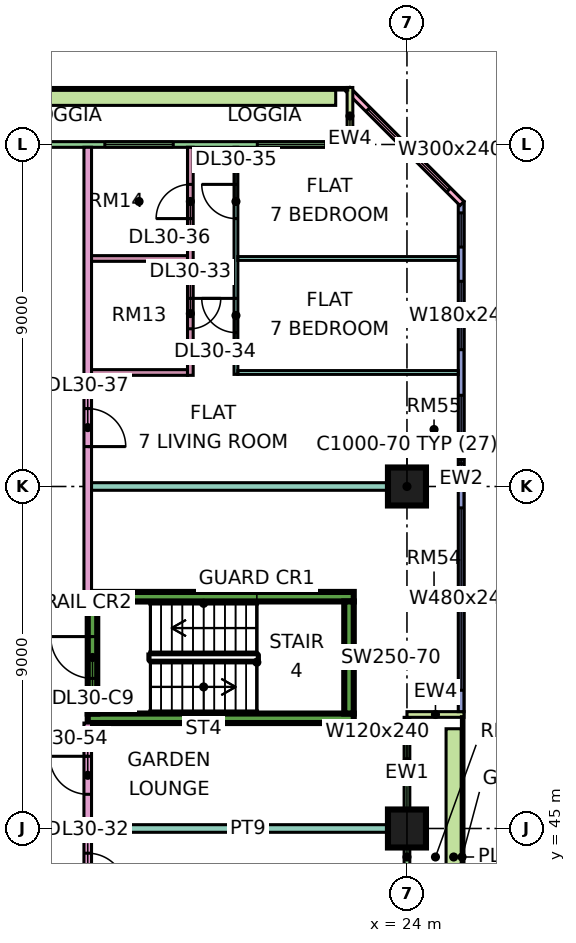
"""IFC4 building model, lengths in metres.
Left out: names, types, materials, properties, quantities, classifications, styles, units other than length and angle.
Written with IfcOpenShell. Run it as: python <this file> out.ifc"""

import sys

from ifc_helpers import new_model, si_unit, direction, frame, frame_2d, origin, origin_2d, place, context, subcontext, project, spatial, rectangle, extrude, element, fill, save


model = new_model("IFC4")
c1 = context("Model", 3, precision=1e-05, world=origin(), true_north=direction((0.0, 1.0)))
c2 = subcontext(c1, "Body", "Model", "MODEL_VIEW")
j1 = project(units=[si_unit("LENGTHUNIT", "METRE"), si_unit("PLANEANGLEUNIT", "RADIAN")], contexts=[c1])
p1 = place(None, origin())
s1 = spatial("IfcSite", under=j1, at=p1, CompositionType="ELEMENT")
p2 = place(p1, origin())
s2 = spatial("IfcBuilding", under=s1, at=p2, CompositionType="ELEMENT")
p3 = place(p2, frame((0.0, 0.0, 129.4)))
s3 = spatial("IfcBuildingStorey", under=s2, at=p3, CompositionType="ELEMENT", Elevation=129.4)
for number, where, z_axis, x_axis in (
    (1, (24.0, 45.0, 0.0), (0.0, 0.0, 1.0), (1.0, 0.0, 0.0)),
    (2, (24.0, 54.0, 0.0), (0.0, 0.0, 1.0), (1.0, 0.0, 0.0)),
):
    element("IfcColumn", number, at=place(p3, frame(where, z_axis=z_axis, x_axis=x_axis)), inside=s3, PredefinedType="COLUMN", context=c2, shape_type="SweptSolid", body=[
        extrude(rectangle(XDim=1.0, YDim=1.0, at=origin_2d()), origin(), (0.0, 0.0, 1.0), 3.75),
    ])
for number, where, z_axis, x_axis in (
    (3, (15.6, 47.9, 0.0), (0.0, 0.0, 1.0), (1.0, 0.0, 0.0)),
    (4, (15.6, 51.1, 0.0), (0.0, 0.0, 1.0), (1.0, 0.0, 0.0)),
):
    element("IfcWall", number, at=place(p3, frame(where, z_axis=z_axis, x_axis=x_axis)), inside=s3, PredefinedType="SHEAR", context=c2, shape_type="SweptSolid", body=[
        extrude(rectangle(XDim=7.0, YDim=0.25, at=frame_2d((3.5, 0.0))), origin(), (0.0, 0.0, 1.0), 3.75),
    ])
p4 = place(p3, frame((15.725, 48.025, 0.0), z_axis=(0.0, 0.0, 1.0), x_axis=(0.0, 1.0, 0.0)))
e5 = element("IfcWall", 5, at=p4, inside=s3, PredefinedType="SHEAR", context=c2, shape_type="SweptSolid", body=[
    extrude(rectangle(XDim=2.95, YDim=0.25, at=frame_2d((1.475, 0.0))), origin(), (0.0, 0.0, 1.0), 3.75),
])
p5 = place(p4, frame((0.925, 0.0, 0.0)))
e6 = element("IfcOpeningElement", 6, at=p5, cuts=e5, PredefinedType="OPENING", context=c2, shape_type="SweptSolid", body=[
    extrude(rectangle(XDim=1.1, YDim=2.2, at=frame_2d((0.55, 1.1))), frame((0.0, 0.135, 0.0), z_axis=(0.0, -1.0, 0.0), x_axis=(1.0, 0.0, 0.0)), (0.0, 0.0, 1.0), 0.27),
])
p6 = place(p3, frame((22.475, 48.025, 0.0), z_axis=(0.0, 0.0, 1.0), x_axis=(0.0, 1.0, 0.0)))
e7 = element("IfcWall", 7, at=p6, inside=s3, PredefinedType="SHEAR", context=c2, shape_type="SweptSolid", body=[
    extrude(rectangle(XDim=2.95, YDim=0.25, at=frame_2d((1.475, 0.0))), origin(), (0.0, 0.0, 1.0), 3.75),
])
p7 = place(p3, frame((24.0, 40.575, 0.0), z_axis=(0.0, 0.0, 1.0), x_axis=(0.0, 1.0, 0.0)))
e8 = element("IfcWall", 8, at=p7, inside=s3, PredefinedType="SOLIDWALL", context=c2, shape_type="SweptSolid", body=[
    extrude(rectangle(XDim=7.35, YDim=0.15, at=frame_2d((3.675, 0.0))), origin(), (0.0, 0.0, 1.0), 3.35),
])
p8 = place(p7, frame((0.262, 0.0, 0.45)))
e9 = element("IfcOpeningElement", 9, at=p8, cuts=e8, PredefinedType="OPENING", context=c2, shape_type="SweptSolid", body=[
    extrude(rectangle(XDim=0.9, YDim=2.4, at=frame_2d((0.45, 1.2))), frame((0.0, 0.085, 0.0), z_axis=(0.0, -1.0, 0.0), x_axis=(1.0, 0.0, 0.0)), (0.0, 0.0, 1.0), 0.17),
])
p9 = place(p7, frame((2.025, 0.0, 0.0)))
e10 = element("IfcOpeningElement", 10, at=p9, cuts=e8, PredefinedType="OPENING", context=c2, shape_type="SweptSolid", body=[
    extrude(rectangle(XDim=1.2, YDim=2.4, at=frame_2d((0.6, 1.2))), frame((0.0, 0.085, 0.0), z_axis=(0.0, -1.0, 0.0), x_axis=(1.0, 0.0, 0.0)), (0.0, 0.0, 1.0), 0.17),
])
p10 = place(p7, frame((5.587, 0.0, 0.45)))
e11 = element("IfcOpeningElement", 11, at=p10, cuts=e8, PredefinedType="OPENING", context=c2, shape_type="SweptSolid", body=[
    extrude(rectangle(XDim=1.2, YDim=2.4, at=frame_2d((0.6, 1.2))), frame((0.0, 0.085, 0.0), z_axis=(0.0, -1.0, 0.0), x_axis=(1.0, 0.0, 0.0)), (0.0, 0.0, 1.0), 0.17),
])
p11 = place(p3, frame((25.5, 48.0, 0.0), z_axis=(0.0, 0.0, 1.0), x_axis=(-1.0, 0.0, 0.0)))
e12 = element("IfcWall", 12, at=p11, inside=s3, PredefinedType="SOLIDWALL", context=c2, shape_type="SweptSolid", body=[
    extrude(rectangle(XDim=1.5, YDim=0.15, at=frame_2d((0.75, 0.0))), origin(), (0.0, 0.0, 1.0), 3.35),
])
p12 = place(p3, frame((25.425, 48.075, 0.0), z_axis=(0.0, 0.0, 1.0), x_axis=(0.0, 1.0, 0.0)))
e13 = element("IfcWall", 13, at=p12, inside=s3, PredefinedType="SOLIDWALL", context=c2, shape_type="SweptSolid", body=[
    extrude(rectangle(XDim=13.425, YDim=0.15, at=frame_2d((6.712, 0.0))), origin(), (0.0, 0.0, 1.0), 3.35),
])
p13 = place(p12, frame((0.562, 0.0, 0.45)))
e14 = element("IfcOpeningElement", 14, at=p13, cuts=e13, PredefinedType="OPENING", context=c2, shape_type="SweptSolid", body=[
    extrude(rectangle(XDim=4.8, YDim=2.4, at=frame_2d((2.4, 1.2))), frame((0.0, 0.085, 0.0), z_axis=(0.0, -1.0, 0.0), x_axis=(1.0, 0.0, 0.0)), (0.0, 0.0, 1.0), 0.17),
])
p14 = place(p12, frame((6.525, 0.0, 0.45)))
e15 = element("IfcOpeningElement", 15, at=p14, cuts=e13, PredefinedType="OPENING", context=c2, shape_type="SweptSolid", body=[
    extrude(rectangle(XDim=1.8, YDim=2.4, at=frame_2d((0.9, 1.2))), frame((0.0, 0.085, 0.0), z_axis=(0.0, -1.0, 0.0), x_axis=(1.0, 0.0, 0.0)), (0.0, 0.0, 1.0), 0.17),
])
p15 = place(p12, frame((9.525, 0.0, 0.45)))
e16 = element("IfcOpeningElement", 16, at=p15, cuts=e13, PredefinedType="OPENING", context=c2, shape_type="SweptSolid", body=[
    extrude(rectangle(XDim=1.8, YDim=2.4, at=frame_2d((0.9, 1.2))), frame((0.0, 0.085, 0.0), z_axis=(0.0, -1.0, 0.0), x_axis=(1.0, 0.0, 0.0)), (0.0, 0.0, 1.0), 0.17),
])
p16 = place(p12, frame((12.225, 0.0, 0.45)))
e17 = element("IfcOpeningElement", 17, at=p16, cuts=e13, PredefinedType="OPENING", context=c2, shape_type="SweptSolid", body=[
    extrude(rectangle(XDim=0.9, YDim=2.4, at=frame_2d((0.45, 1.2))), frame((0.0, 0.085, 0.0), z_axis=(0.0, -1.0, 0.0), x_axis=(1.0, 0.0, 0.0)), (0.0, 0.0, 1.0), 0.17),
])
p17 = place(p3, frame((25.447, 61.447, 0.0), z_axis=(0.0, 0.0, 1.0), x_axis=(-0.707106781187, 0.707106781187, 0.0)))
e18 = element("IfcWall", 18, at=p17, inside=s3, PredefinedType="SOLIDWALL", context=c2, shape_type="SweptSolid", body=[
    extrude(rectangle(XDim=4.243, YDim=0.15, at=frame_2d((2.121, 0.0))), origin(), (0.0, 0.0, 1.0), 3.35),
])
p18 = place(p17, frame((0.498, 0.0, 0.45)))
e19 = element("IfcOpeningElement", 19, at=p18, cuts=e18, PredefinedType="OPENING", context=c2, shape_type="SweptSolid", body=[
    extrude(rectangle(XDim=3.0, YDim=2.4, at=frame_2d((1.5, 1.2))), frame((0.0, 0.085, 0.0), z_axis=(0.0, -1.0, 0.0), x_axis=(1.0, 0.0, 0.0)), (0.0, 0.0, 1.0), 0.17),
])
p19 = place(p3, frame((22.425, 63.0, 0.0), z_axis=(0.0, 0.0, 1.0), x_axis=(-1.0, 0.0, 0.0)))
e20 = element("IfcWall", 20, at=p19, inside=s3, PredefinedType="SOLIDWALL", context=c2, shape_type="SweptSolid", body=[
    extrude(rectangle(XDim=10.35, YDim=0.15, at=frame_2d((5.175, 0.0))), origin(), (0.0, 0.0, 1.0), 3.35),
])
p20 = place(p19, frame((0.562, 0.0, 0.45)))
e21 = element("IfcOpeningElement", 21, at=p20, cuts=e20, PredefinedType="OPENING", context=c2, shape_type="SweptSolid", body=[
    extrude(rectangle(XDim=1.8, YDim=2.4, at=frame_2d((0.9, 1.2))), frame((0.0, 0.085, 0.0), z_axis=(0.0, -1.0, 0.0), x_axis=(1.0, 0.0, 0.0)), (0.0, 0.0, 1.0), 0.17),
])
p21 = place(p19, frame((4.575, 0.0, 0.45)))
e22 = element("IfcOpeningElement", 22, at=p21, cuts=e20, PredefinedType="OPENING", context=c2, shape_type="SweptSolid", body=[
    extrude(rectangle(XDim=1.8, YDim=2.4, at=frame_2d((0.9, 1.2))), frame((0.0, 0.085, 0.0), z_axis=(0.0, -1.0, 0.0), x_axis=(1.0, 0.0, 0.0)), (0.0, 0.0, 1.0), 0.17),
])
p22 = place(p3, frame((22.5, 64.5, 0.0), z_axis=(0.0, 0.0, 1.0), x_axis=(0.0, -1.0, 0.0)))
e23 = element("IfcWall", 23, at=p22, inside=s3, PredefinedType="SOLIDWALL", context=c2, shape_type="SweptSolid", body=[
    extrude(rectangle(XDim=1.5, YDim=0.15, at=frame_2d((0.75, 0.0))), origin(), (0.0, 0.0, 1.0), 3.35),
])
p23 = place(p3, frame((25.229, 40.875, 0.0), z_axis=(0.0, 0.0, 1.0), x_axis=(0.0, 1.0, 0.0)))
e24 = element("IfcWall", 24, at=p23, inside=s3, PredefinedType="SOLIDWALL", context=c2, shape_type="SweptSolid", body=[
    extrude(rectangle(XDim=6.75, YDim=0.4, at=frame_2d((3.375, 0.0))), origin(), (0.0, 0.0, 1.0), 0.7),
])
p24 = place(p3, frame((22.125, 64.229, 0.0), z_axis=(0.0, 0.0, 1.0), x_axis=(-1.0, 0.0, 0.0)))
e25 = element("IfcWall", 25, at=p24, inside=s3, PredefinedType="SOLIDWALL", context=c2, shape_type="SweptSolid", body=[
    extrude(rectangle(XDim=9.75, YDim=0.4, at=frame_2d((4.875, 0.0))), origin(), (0.0, 0.0, 1.0), 0.7),
])
p25 = place(p3, frame((15.6, 20.0, 0.0), z_axis=(0.0, 0.0, 1.0), x_axis=(0.0, 1.0, 0.0)))
e26 = element("IfcWall", 26, at=p25, inside=s3, PredefinedType="PARTITIONING", context=c2, shape_type="SweptSolid", body=[
    extrude(rectangle(XDim=27.775, YDim=0.2, at=frame_2d((13.887, 0.0))), origin(), (0.0, 0.0, 1.0), 3.35),
])
p26 = place(p25, frame((6.55, 0.0, 0.0)))
e27 = element("IfcOpeningElement", 27, at=p26, cuts=e26, PredefinedType="OPENING", context=c2, shape_type="SweptSolid", body=[
    extrude(rectangle(XDim=1.0, YDim=2.1, at=frame_2d((0.5, 1.05))), frame((0.0, 0.11, 0.0), z_axis=(0.0, -1.0, 0.0), x_axis=(1.0, 0.0, 0.0)), (0.0, 0.0, 1.0), 0.22),
])
p27 = place(p25, frame((12.25, 0.0, 0.0)))
e28 = element("IfcOpeningElement", 28, at=p27, cuts=e26, PredefinedType="OPENING", context=c2, shape_type="SweptSolid", body=[
    extrude(rectangle(XDim=1.6, YDim=2.1, at=frame_2d((0.8, 1.05))), frame((0.0, 0.11, 0.0), z_axis=(0.0, -1.0, 0.0), x_axis=(1.0, 0.0, 0.0)), (0.0, 0.0, 1.0), 0.22),
])
p28 = place(p25, frame((23.35, 0.0, 0.0)))
e29 = element("IfcOpeningElement", 29, at=p28, cuts=e26, PredefinedType="OPENING", context=c2, shape_type="SweptSolid", body=[
    extrude(rectangle(XDim=1.0, YDim=2.1, at=frame_2d((0.5, 1.05))), frame((0.0, 0.11, 0.0), z_axis=(0.0, -1.0, 0.0), x_axis=(1.0, 0.0, 0.0)), (0.0, 0.0, 1.0), 0.22),
])
p29 = place(p25, frame((1.15, 0.0, 0.0)))
e30 = element("IfcOpeningElement", 30, at=p29, cuts=e26, PredefinedType="OPENING", context=c2, shape_type="SweptSolid", body=[
    extrude(rectangle(XDim=1.8, YDim=2.1, at=frame_2d((0.9, 1.05))), frame((0.0, 0.11, 0.0), z_axis=(0.0, -1.0, 0.0), x_axis=(1.0, 0.0, 0.0)), (0.0, 0.0, 1.0), 0.22),
])
p30 = place(p25, frame((25.9, 0.0, 0.0)))
e31 = element("IfcOpeningElement", 31, at=p30, cuts=e26, PredefinedType="OPENING", context=c2, shape_type="SweptSolid", body=[
    extrude(rectangle(XDim=1.0, YDim=2.1, at=frame_2d((0.5, 1.05))), frame((0.0, 0.11, 0.0), z_axis=(0.0, -1.0, 0.0), x_axis=(1.0, 0.0, 0.0)), (0.0, 0.0, 1.0), 0.22),
])
p31 = place(p3, frame((15.6, 51.225, 0.0), z_axis=(0.0, 0.0, 1.0), x_axis=(0.0, 1.0, 0.0)))
e32 = element("IfcWall", 32, at=p31, inside=s3, PredefinedType="PARTITIONING", context=c2, shape_type="SweptSolid", body=[
    extrude(rectangle(XDim=11.701, YDim=0.2, at=frame_2d((5.851, 0.0))), origin(), (0.0, 0.0, 1.0), 3.35),
])
p32 = place(p31, frame((3.825, 0.0, 0.0)))
e33 = element("IfcOpeningElement", 33, at=p32, cuts=e32, PredefinedType="OPENING", context=c2, shape_type="SweptSolid", body=[
    extrude(rectangle(XDim=1.0, YDim=2.1, at=frame_2d((0.5, 1.05))), frame((0.0, 0.11, 0.0), z_axis=(0.0, -1.0, 0.0), x_axis=(1.0, 0.0, 0.0)), (0.0, 0.0, 1.0), 0.22),
])
p33 = place(p3, frame((15.7, 45.0, 0.0), z_axis=(0.0, 0.0, 1.0), x_axis=(1.0, 0.0, 0.0)))
e34 = element("IfcWall", 34, at=p33, inside=s3, PredefinedType="PARTITIONING", context=c2, shape_type="SweptSolid", body=[
    extrude(rectangle(XDim=8.226, YDim=0.2, at=frame_2d((4.113, 0.0))), origin(), (0.0, 0.0, 1.0), 3.35),
])
p34 = place(p3, frame((15.7, 54.0, 0.0), z_axis=(0.0, 0.0, 1.0), x_axis=(1.0, 0.0, 0.0)))
e35 = element("IfcWall", 35, at=p34, inside=s3, PredefinedType="PARTITIONING", context=c2, shape_type="SweptSolid", body=[
    extrude(rectangle(XDim=8.3, YDim=0.2, at=frame_2d((4.15, 0.0))), origin(), (0.0, 0.0, 1.0), 3.35),
])
for number, where, z_axis, x_axis in (
    (36, (15.7, 57.0, 0.0), (0.0, 0.0, 1.0), (1.0, 0.0, 0.0)),
    (37, (15.7, 60.0, 0.0), (0.0, 0.0, 1.0), (1.0, 0.0, 0.0)),
):
    element("IfcWall", number, at=place(p3, frame(where, z_axis=z_axis, x_axis=x_axis)), inside=s3, PredefinedType="PARTITIONING", context=c2, shape_type="SweptSolid", body=[
        extrude(rectangle(XDim=2.525, YDim=0.15, at=frame_2d((1.263, 0.0))), origin(), (0.0, 0.0, 1.0), 3.35),
    ])
p35 = place(p3, frame((18.3, 56.925, 0.0), z_axis=(0.0, 0.0, 1.0), x_axis=(0.0, 1.0, 0.0)))
e38 = element("IfcWall", 38, at=p35, inside=s3, PredefinedType="PARTITIONING", context=c2, shape_type="SweptSolid", body=[
    extrude(rectangle(XDim=6.001, YDim=0.15, at=frame_2d((3.0, 0.0))), origin(), (0.0, 0.0, 1.0), 3.35),
])
p36 = place(p35, frame((1.225, 0.0, 0.0)))
e39 = element("IfcOpeningElement", 39, at=p36, cuts=e38, PredefinedType="OPENING", context=c2, shape_type="SweptSolid", body=[
    extrude(rectangle(XDim=0.8, YDim=2.1, at=frame_2d((0.4, 1.05))), frame((0.0, 0.085, 0.0), z_axis=(0.0, -1.0, 0.0), x_axis=(1.0, 0.0, 0.0)), (0.0, 0.0, 1.0), 0.17),
])
p37 = place(p35, frame((4.125, 0.0, 0.0)))
e40 = element("IfcOpeningElement", 40, at=p37, cuts=e38, PredefinedType="OPENING", context=c2, shape_type="SweptSolid", body=[
    extrude(rectangle(XDim=0.9, YDim=2.1, at=frame_2d((0.45, 1.05))), frame((0.0, 0.085, 0.0), z_axis=(0.0, -1.0, 0.0), x_axis=(1.0, 0.0, 0.0)), (0.0, 0.0, 1.0), 0.17),
])
p38 = place(p3, frame((19.5, 56.95, 0.0), z_axis=(0.0, 0.0, 1.0), x_axis=(0.0, 1.0, 0.0)))
e41 = element("IfcWall", 41, at=p38, inside=s3, PredefinedType="PARTITIONING", context=c2, shape_type="SweptSolid", body=[
    extrude(rectangle(XDim=5.976, YDim=0.1, at=frame_2d((2.988, 0.0))), origin(), (0.0, 0.0, 1.0), 3.35),
])
p39 = place(p38, frame((1.1, 0.0, 0.0)))
e42 = element("IfcOpeningElement", 42, at=p39, cuts=e41, PredefinedType="OPENING", context=c2, shape_type="SweptSolid", body=[
    extrude(rectangle(XDim=0.9, YDim=2.1, at=frame_2d((0.45, 1.05))), frame((0.0, 0.06, 0.0), z_axis=(0.0, -1.0, 0.0), x_axis=(1.0, 0.0, 0.0)), (0.0, 0.0, 1.0), 0.12),
])
p40 = place(p38, frame((4.1, 0.0, 0.0)))
e43 = element("IfcOpeningElement", 43, at=p40, cuts=e41, PredefinedType="OPENING", context=c2, shape_type="SweptSolid", body=[
    extrude(rectangle(XDim=0.9, YDim=2.1, at=frame_2d((0.45, 1.05))), frame((0.0, 0.06, 0.0), z_axis=(0.0, -1.0, 0.0), x_axis=(1.0, 0.0, 0.0)), (0.0, 0.0, 1.0), 0.12),
])
p41 = place(p3, frame((19.55, 57.0, 0.0), z_axis=(0.0, 0.0, 1.0), x_axis=(1.0, 0.0, 0.0)))
e44 = element("IfcWall", 44, at=p41, inside=s3, PredefinedType="PARTITIONING", context=c2, shape_type="SweptSolid", body=[
    extrude(rectangle(XDim=5.8, YDim=0.1, at=frame_2d((2.9, 0.0))), origin(), (0.0, 0.0, 1.0), 3.35),
])
p42 = place(p3, frame((19.55, 60.0, 0.0), z_axis=(0.0, 0.0, 1.0), x_axis=(1.0, 0.0, 0.0)))
e45 = element("IfcWall", 45, at=p42, inside=s3, PredefinedType="PARTITIONING", context=c2, shape_type="SweptSolid", body=[
    extrude(rectangle(XDim=5.801, YDim=0.1, at=frame_2d((2.9, 0.0))), origin(), (0.0, 0.0, 1.0), 3.35),
])
p43 = place(p10, origin())
e46 = element("IfcWindow", 46, at=p43, inside=s3, PartitioningType="SINGLE_PANEL", PredefinedType="WINDOW", context=c2, shape_type="SweptSolid", body=[
    extrude(rectangle(XDim=1.2, YDim=2.4, at=frame_2d((0.6, 1.2))), frame((0.0, 0.03, 0.0), z_axis=(0.0, -1.0, 0.0), x_axis=(1.0, 0.0, 0.0)), (0.0, 0.0, 1.0), 0.06),
])
fill(e11, e46)
p44 = place(p13, origin())
e47 = element("IfcWindow", 47, at=p44, inside=s3, PartitioningType="SINGLE_PANEL", PredefinedType="WINDOW", context=c2, shape_type="SweptSolid", body=[
    extrude(rectangle(XDim=4.8, YDim=2.4, at=frame_2d((2.4, 1.2))), frame((0.0, 0.03, 0.0), z_axis=(0.0, -1.0, 0.0), x_axis=(1.0, 0.0, 0.0)), (0.0, 0.0, 1.0), 0.06),
])
fill(e14, e47)
p45 = place(p14, origin())
e48 = element("IfcWindow", 48, at=p45, inside=s3, PartitioningType="SINGLE_PANEL", PredefinedType="WINDOW", context=c2, shape_type="SweptSolid", body=[
    extrude(rectangle(XDim=1.8, YDim=2.4, at=frame_2d((0.9, 1.2))), frame((0.0, 0.03, 0.0), z_axis=(0.0, -1.0, 0.0), x_axis=(1.0, 0.0, 0.0)), (0.0, 0.0, 1.0), 0.06),
])
fill(e15, e48)
p46 = place(p15, origin())
e49 = element("IfcWindow", 49, at=p46, inside=s3, PartitioningType="SINGLE_PANEL", PredefinedType="WINDOW", context=c2, shape_type="SweptSolid", body=[
    extrude(rectangle(XDim=1.8, YDim=2.4, at=frame_2d((0.9, 1.2))), frame((0.0, 0.03, 0.0), z_axis=(0.0, -1.0, 0.0), x_axis=(1.0, 0.0, 0.0)), (0.0, 0.0, 1.0), 0.06),
])
fill(e16, e49)
p47 = place(p16, origin())
e50 = element("IfcWindow", 50, at=p47, inside=s3, PartitioningType="SINGLE_PANEL", PredefinedType="WINDOW", context=c2, shape_type="SweptSolid", body=[
    extrude(rectangle(XDim=0.9, YDim=2.4, at=frame_2d((0.45, 1.2))), frame((0.0, 0.03, 0.0), z_axis=(0.0, -1.0, 0.0), x_axis=(1.0, 0.0, 0.0)), (0.0, 0.0, 1.0), 0.06),
])
fill(e17, e50)
p48 = place(p18, origin())
e51 = element("IfcWindow", 51, at=p48, inside=s3, PartitioningType="SINGLE_PANEL", PredefinedType="WINDOW", context=c2, shape_type="SweptSolid", body=[
    extrude(rectangle(XDim=3.0, YDim=2.4, at=frame_2d((1.5, 1.2))), frame((0.0, 0.03, 0.0), z_axis=(0.0, -1.0, 0.0), x_axis=(1.0, 0.0, 0.0)), (0.0, 0.0, 1.0), 0.06),
])
fill(e19, e51)
p49 = place(p20, origin())
e52 = element("IfcWindow", 52, at=p49, inside=s3, PartitioningType="SINGLE_PANEL", PredefinedType="WINDOW", context=c2, shape_type="SweptSolid", body=[
    extrude(rectangle(XDim=1.8, YDim=2.4, at=frame_2d((0.9, 1.2))), frame((0.0, 0.03, 0.0), z_axis=(0.0, -1.0, 0.0), x_axis=(1.0, 0.0, 0.0)), (0.0, 0.0, 1.0), 0.06),
])
fill(e21, e52)
p50 = place(p21, origin())
e53 = element("IfcWindow", 53, at=p50, inside=s3, PartitioningType="SINGLE_PANEL", PredefinedType="WINDOW", context=c2, shape_type="SweptSolid", body=[
    extrude(rectangle(XDim=1.8, YDim=2.4, at=frame_2d((0.9, 1.2))), frame((0.0, 0.03, 0.0), z_axis=(0.0, -1.0, 0.0), x_axis=(1.0, 0.0, 0.0)), (0.0, 0.0, 1.0), 0.06),
])
fill(e22, e53)
p51 = place(p5, frame((1.1, 0.0, 0.0), z_axis=(0.0, 0.0, 1.0), x_axis=(-1.0, 0.0, 0.0)))
e54 = element("IfcDoor", 54, at=p51, inside=s3, OperationType="SINGLE_SWING_RIGHT", PredefinedType="DOOR", context=c2, shape_type="SweptSolid", body=[
    extrude(rectangle(XDim=1.1, YDim=2.2, at=frame_2d((0.55, 1.1))), frame((0.0, 0.025, 0.0), z_axis=(0.0, -1.0, 0.0), x_axis=(1.0, 0.0, 0.0)), (0.0, 0.0, 1.0), 0.05),
])
fill(e6, e54)
p52 = place(p28, frame((1.0, 0.0, 0.0), z_axis=(0.0, 0.0, 1.0), x_axis=(-1.0, 0.0, 0.0)))
e55 = element("IfcDoor", 55, at=p52, inside=s3, OperationType="SINGLE_SWING_LEFT", PredefinedType="DOOR", context=c2, shape_type="SweptSolid", body=[
    extrude(rectangle(XDim=1.0, YDim=2.1, at=frame_2d((0.5, 1.05))), frame((0.0, 0.025, 0.0), z_axis=(0.0, -1.0, 0.0), x_axis=(1.0, 0.0, 0.0)), (0.0, 0.0, 1.0), 0.05),
])
fill(e29, e55)
p53 = place(p36, origin())
e56 = element("IfcDoor", 56, at=p53, inside=s3, OperationType="SINGLE_SWING_RIGHT", PredefinedType="DOOR", context=c2, shape_type="SweptSolid", body=[
    extrude(rectangle(XDim=0.8, YDim=2.1, at=frame_2d((0.4, 1.05))), frame((0.0, 0.025, 0.0), z_axis=(0.0, -1.0, 0.0), x_axis=(1.0, 0.0, 0.0)), (0.0, 0.0, 1.0), 0.05),
])
fill(e39, e56)
p54 = place(p39, frame((0.9, 0.0, 0.0), z_axis=(0.0, 0.0, 1.0), x_axis=(-1.0, 0.0, 0.0)))
e57 = element("IfcDoor", 57, at=p54, inside=s3, OperationType="SINGLE_SWING_RIGHT", PredefinedType="DOOR", context=c2, shape_type="SweptSolid", body=[
    extrude(rectangle(XDim=0.9, YDim=2.1, at=frame_2d((0.45, 1.05))), frame((0.0, 0.025, 0.0), z_axis=(0.0, -1.0, 0.0), x_axis=(1.0, 0.0, 0.0)), (0.0, 0.0, 1.0), 0.05),
])
fill(e42, e57)
p55 = place(p40, frame((0.9, 0.0, 0.0), z_axis=(0.0, 0.0, 1.0), x_axis=(-1.0, 0.0, 0.0)))
e58 = element("IfcDoor", 58, at=p55, inside=s3, OperationType="SINGLE_SWING_RIGHT", PredefinedType="DOOR", context=c2, shape_type="SweptSolid", body=[
    extrude(rectangle(XDim=0.9, YDim=2.1, at=frame_2d((0.45, 1.05))), frame((0.0, 0.025, 0.0), z_axis=(0.0, -1.0, 0.0), x_axis=(1.0, 0.0, 0.0)), (0.0, 0.0, 1.0), 0.05),
])
fill(e43, e58)
p56 = place(p37, origin())
e59 = element("IfcDoor", 59, at=p56, inside=s3, OperationType="SINGLE_SWING_LEFT", PredefinedType="DOOR", context=c2, shape_type="SweptSolid", body=[
    extrude(rectangle(XDim=0.9, YDim=2.1, at=frame_2d((0.45, 1.05))), frame((0.0, 0.025, 0.0), z_axis=(0.0, -1.0, 0.0), x_axis=(1.0, 0.0, 0.0)), (0.0, 0.0, 1.0), 0.05),
])
fill(e40, e59)
p57 = place(p32, frame((1.0, 0.0, 0.0), z_axis=(0.0, 0.0, 1.0), x_axis=(-1.0, 0.0, 0.0)))
e60 = element("IfcDoor", 60, at=p57, inside=s3, OperationType="SINGLE_SWING_LEFT", PredefinedType="DOOR", context=c2, shape_type="SweptSolid", body=[
    extrude(rectangle(XDim=1.0, YDim=2.1, at=frame_2d((0.5, 1.05))), frame((0.0, 0.025, 0.0), z_axis=(0.0, -1.0, 0.0), x_axis=(1.0, 0.0, 0.0)), (0.0, 0.0, 1.0), 0.05),
])
fill(e33, e60)
p58 = place(p30, frame((1.0, 0.0, 0.0), z_axis=(0.0, 0.0, 1.0), x_axis=(-1.0, 0.0, 0.0)))
e61 = element("IfcDoor", 61, at=p58, inside=s3, OperationType="SINGLE_SWING_RIGHT", PredefinedType="DOOR", context=c2, shape_type="SweptSolid", body=[
    extrude(rectangle(XDim=1.0, YDim=2.1, at=frame_2d((0.5, 1.05))), frame((0.0, 0.025, 0.0), z_axis=(0.0, -1.0, 0.0), x_axis=(1.0, 0.0, 0.0)), (0.0, 0.0, 1.0), 0.05),
])
fill(e31, e61)
save(model, sys.argv[1])
